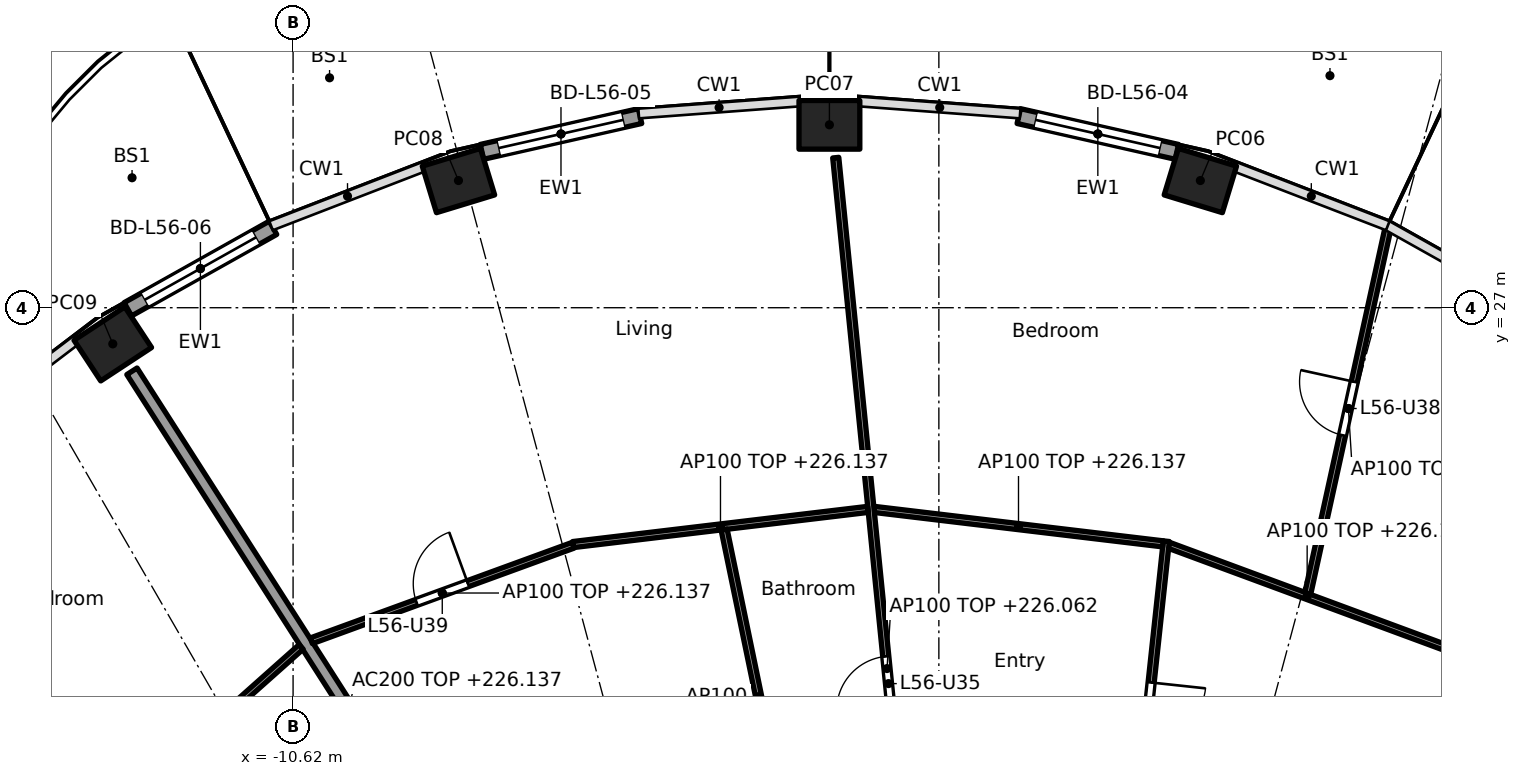
"""IFC4 building model, lengths in metres.
Left out: names, types, materials, properties, quantities, classifications, styles, units other than length and angle.
Written with IfcOpenShell. Run it as: python <this file> out.ifc"""

import sys

from ifc_helpers import new_model, si_unit, direction, frame, frame_2d, origin, origin_2d, place, context, subcontext, project, spatial, rectangle, hollow_rectangle, extrude, element, fill, save


model = new_model("IFC4")
c1 = context("Model", 3, precision=1e-05, world=origin(), true_north=direction((0.0, 1.0)))
c2 = subcontext(c1, "Body", "Model", "MODEL_VIEW")
j1 = project(units=[si_unit("LENGTHUNIT", "METRE"), si_unit("PLANEANGLEUNIT", "RADIAN")], contexts=[c1])
p1 = place(None, origin())
s1 = spatial("IfcSite", under=j1, at=p1, CompositionType="ELEMENT")
p2 = place(p1, origin())
s2 = spatial("IfcBuilding", under=s1, at=p2, CompositionType="ELEMENT")
p3 = place(p2, frame((0.0, 0.0, 223.3)))
s3 = spatial("IfcBuildingStorey", under=s2, at=p3, CompositionType="ELEMENT", Elevation=223.3)
for number, where, z_axis, x_axis in (
    (1, (4.3, 29.092, 0.0), (0.0, 0.0, 1.0), (-0.957, 0.292, 0.0)),
    (2, (-1.8, 30.008, 0.0), (0.0, 0.0, 1.0), (-1.0, 0.0, 0.0)),
    (3, (-7.9, 29.092, 0.0), (0.0, 0.0, 1.0), (-0.957, -0.292, 0.0)),
    (4, (-13.585, 26.405, 0.0), (0.0, 0.0, 1.0), (-0.836, -0.549, 0.0)),
):
    element("IfcColumn", number, at=place(p3, frame(where, z_axis=z_axis, x_axis=x_axis)), inside=s3, PredefinedType="COLUMN", context=c2, shape_type="SweptSolid", body=[
        extrude(hollow_rectangle(XDim=1.0, YDim=0.8, WallThickness=0.032, at=origin_2d()), origin(), (0.0, 0.0, 1.0), 3.7),
    ])
p4 = place(p3, frame((1.314, 30.151, 0.0), z_axis=(0.0, 0.0, 1.0), x_axis=(0.975324089124, -0.220777990694, 0.0)))
e5 = element("IfcWall", 5, at=p4, inside=s3, PredefinedType="SOLIDWALL", context=c2, shape_type="SweptSolid", body=[
    extrude(rectangle(XDim=2.666, YDim=0.25, at=frame_2d((1.333, 0.0))), origin(), (0.0, 0.0, 1.0), 3.44),
])
p5 = place(p4, frame((0.283, 0.0, 0.0)))
e6 = element("IfcOpeningElement", 6, at=p5, cuts=e5, PredefinedType="OPENING", context=c2, shape_type="SweptSolid", body=[
    extrude(rectangle(XDim=2.1, YDim=2.4, at=frame_2d((1.05, 1.2))), frame((0.0, 0.135, 0.0), z_axis=(0.0, -1.0, 0.0), x_axis=(1.0, 0.0, 0.0)), (0.0, 0.0, 1.0), 0.27),
])
p6 = place(p3, frame((-7.514, 29.563, 0.0), z_axis=(0.0, 0.0, 1.0), x_axis=(0.975324089124, 0.220777990694, 0.0)))
e7 = element("IfcWall", 7, at=p6, inside=s3, PredefinedType="SOLIDWALL", context=c2, shape_type="SweptSolid", body=[
    extrude(rectangle(XDim=2.666, YDim=0.25, at=frame_2d((1.333, 0.0))), origin(), (0.0, 0.0, 1.0), 3.44),
])
p7 = place(p6, frame((0.283, 0.0, 0.0)))
e8 = element("IfcOpeningElement", 8, at=p7, cuts=e7, PredefinedType="OPENING", context=c2, shape_type="SweptSolid", body=[
    extrude(rectangle(XDim=2.1, YDim=2.4, at=frame_2d((1.05, 1.2))), frame((0.0, 0.135, 0.0), z_axis=(0.0, -1.0, 0.0), x_axis=(1.0, 0.0, 0.0)), (0.0, 0.0, 1.0), 0.27),
])
p8 = place(p3, frame((-13.338, 26.974, 0.0), z_axis=(0.0, 0.0, 1.0), x_axis=(0.872101280701, 0.489325409313, 0.0)))
e9 = element("IfcWall", 9, at=p8, inside=s3, PredefinedType="SOLIDWALL", context=c2, shape_type="SweptSolid", body=[
    extrude(rectangle(XDim=2.738, YDim=0.25, at=frame_2d((1.369, 0.0))), origin(), (0.0, 0.0, 1.0), 3.44),
])
p9 = place(p8, frame((0.319, 0.0, 0.0)))
e10 = element("IfcOpeningElement", 10, at=p9, cuts=e9, PredefinedType="OPENING", context=c2, shape_type="SweptSolid", body=[
    extrude(rectangle(XDim=2.1, YDim=2.4, at=frame_2d((1.05, 1.2))), frame((0.0, 0.135, 0.0), z_axis=(0.0, -1.0, 0.0), x_axis=(1.0, 0.0, 0.0)), (0.0, 0.0, 1.0), 0.27),
])
p10 = place(p3, frame((-6.15, 14.824, 0.0), z_axis=(0.0, 0.0, 1.0), x_axis=(-0.538870687577, 0.842388498301, 0.0)))
e11 = element("IfcWall", 11, at=p10, inside=s3, PredefinedType="PARTITIONING", context=c2, shape_type="SweptSolid", body=[
    extrude(rectangle(XDim=13.213, YDim=0.2, at=frame_2d((6.606, 0.0))), origin(), (0.0, 0.0, 1.0), 2.837),
])
p11 = place(p3, frame((8.331, 21.411, 0.0), z_axis=(0.0, 0.0, 1.0), x_axis=(-0.937891982431, 0.346927412136, 0.0)))
e12 = element("IfcWall", 12, at=p11, inside=s3, PredefinedType="PARTITIONING", context=c2, shape_type="SweptSolid", body=[
    extrude(rectangle(XDim=4.85, YDim=0.1, at=frame_2d((2.425, 0.0))), origin(), (0.0, 0.0, 1.0), 2.837),
])
p12 = place(p3, frame((6.067, 22.301, 0.0), z_axis=(0.0, 0.0, 1.0), x_axis=(0.214401821533, 0.976745544614, 0.0)))
e13 = element("IfcWall", 13, at=p12, inside=s3, PredefinedType="PARTITIONING", context=c2, shape_type="SweptSolid", body=[
    extrude(rectangle(XDim=6.228, YDim=0.1, at=frame_2d((3.114, 0.0))), origin(), (0.0, 0.0, 1.0), 2.983),
])
p13 = place(p12, frame((2.664, 0.0, 0.0)))
e14 = element("IfcOpeningElement", 14, at=p13, cuts=e13, PredefinedType="OPENING", context=c2, shape_type="SweptSolid", body=[
    extrude(rectangle(XDim=0.9, YDim=2.1, at=frame_2d((0.45, 1.05))), frame((0.0, 0.06, 0.0), z_axis=(0.0, -1.0, 0.0), x_axis=(1.0, 0.0, 0.0)), (0.0, 0.0, 1.0), 0.12),
])
p14 = place(p3, frame((2.613, 12.664, 0.0), z_axis=(0.0, 0.0, 1.0), x_axis=(0.106823825758, 0.994277964279, 0.0)))
e15 = element("IfcWall", 15, at=p14, inside=s3, PredefinedType="PARTITIONING", context=c2, shape_type="SweptSolid", body=[
    extrude(rectangle(XDim=10.556, YDim=0.1, at=frame_2d((5.278, 0.0))), origin(), (0.0, 0.0, 1.0), 2.762),
])
p15 = place(p14, frame((2.066, 0.0, 0.0)))
e16 = element("IfcOpeningElement", 16, at=p15, cuts=e15, PredefinedType="OPENING", context=c2, shape_type="SweptSolid", body=[
    extrude(rectangle(XDim=0.9, YDim=2.1, at=frame_2d((0.45, 1.05))), frame((0.0, 0.06, 0.0), z_axis=(0.0, -1.0, 0.0), x_axis=(1.0, 0.0, 0.0)), (0.0, 0.0, 1.0), 0.12),
])
p16 = place(p14, frame((7.32, 0.0, 0.0)))
e17 = element("IfcOpeningElement", 17, at=p16, cuts=e15, PredefinedType="OPENING", context=c2, shape_type="SweptSolid", body=[
    extrude(rectangle(XDim=0.9, YDim=2.1, at=frame_2d((0.45, 1.05))), frame((0.0, 0.06, 0.0), z_axis=(0.0, -1.0, 0.0), x_axis=(1.0, 0.0, 0.0)), (0.0, 0.0, 1.0), 0.12),
])
p17 = place(p3, frame((3.686, 23.117, 0.0), z_axis=(0.0, 0.0, 1.0), x_axis=(-0.992965872314, 0.11840091393, 0.0)))
e18 = element("IfcWall", 18, at=p17, inside=s3, PredefinedType="PARTITIONING", context=c2, shape_type="SweptSolid", body=[
    extrude(rectangle(XDim=4.786, YDim=0.1, at=frame_2d((2.393, 0.0))), origin(), (0.0, 0.0, 1.0), 2.837),
])
p18 = place(p3, frame((-0.01, 12.664, 0.0), z_axis=(0.0, 0.0, 1.0), x_axis=(-0.099808591851, 0.995006655753, 0.0)))
e19 = element("IfcWall", 19, at=p18, inside=s3, PredefinedType="PARTITIONING", context=c2, shape_type="SweptSolid", body=[
    extrude(rectangle(XDim=16.888, YDim=0.1, at=frame_2d((8.444, 0.0))), origin(), (0.0, 0.0, 1.0), 2.762),
])
p19 = place(p18, frame((2.205, 0.0, 0.0)))
e20 = element("IfcOpeningElement", 20, at=p19, cuts=e19, PredefinedType="OPENING", context=c2, shape_type="SweptSolid", body=[
    extrude(rectangle(XDim=0.9, YDim=2.1, at=frame_2d((0.45, 1.05))), frame((0.0, 0.06, 0.0), z_axis=(0.0, -1.0, 0.0), x_axis=(1.0, 0.0, 0.0)), (0.0, 0.0, 1.0), 0.12),
])
p20 = place(p18, frame((7.745, 0.0, 0.0)))
e21 = element("IfcOpeningElement", 21, at=p20, cuts=e19, PredefinedType="OPENING", context=c2, shape_type="SweptSolid", body=[
    extrude(rectangle(XDim=0.9, YDim=2.1, at=frame_2d((0.45, 1.05))), frame((0.0, 0.06, 0.0), z_axis=(0.0, -1.0, 0.0), x_axis=(1.0, 0.0, 0.0)), (0.0, 0.0, 1.0), 0.12),
])
p21 = place(p3, frame((-1.166, 23.683, 0.0), z_axis=(0.0, 0.0, 1.0), x_axis=(-0.992961712415, -0.118435795593, 0.0)))
e22 = element("IfcWall", 22, at=p21, inside=s3, PredefinedType="PARTITIONING", context=c2, shape_type="SweptSolid", body=[
    extrude(rectangle(XDim=4.885, YDim=0.1, at=frame_2d((2.443, 0.0))), origin(), (0.0, 0.0, 1.0), 2.837),
])
p22 = place(p3, frame((-2.395, 17.857, 0.0), z_axis=(0.0, 0.0, 1.0), x_axis=(-0.20251351451, 0.979279467997, 0.0)))
e23 = element("IfcWall", 23, at=p22, inside=s3, PredefinedType="PARTITIONING", context=c2, shape_type="SweptSolid", body=[
    extrude(rectangle(XDim=5.611, YDim=0.1, at=frame_2d((2.805, 0.0))), origin(), (0.0, 0.0, 1.0), 3.44),
])
p23 = place(p3, frame((-6.014, 23.094, 0.0), z_axis=(0.0, 0.0, 1.0), x_axis=(-0.939433575811, -0.342731026665, 0.0)))
e24 = element("IfcWall", 24, at=p23, inside=s3, PredefinedType="PARTITIONING", context=c2, shape_type="SweptSolid", body=[
    extrude(rectangle(XDim=4.583, YDim=0.1, at=frame_2d((2.291, 0.0))), origin(), (0.0, 0.0, 1.0), 2.837),
])
p24 = place(p23, frame((1.841, 0.0, 0.0)))
e25 = element("IfcOpeningElement", 25, at=p24, cuts=e24, PredefinedType="OPENING", context=c2, shape_type="SweptSolid", body=[
    extrude(rectangle(XDim=0.9, YDim=2.1, at=frame_2d((0.45, 1.05))), frame((0.0, 0.06, 0.0), z_axis=(0.0, -1.0, 0.0), x_axis=(1.0, 0.0, 0.0)), (0.0, 0.0, 1.0), 0.12),
])
p25 = place(p3, frame((-10.488, 21.422, 0.0), z_axis=(0.0, 0.0, 1.0), x_axis=(-0.747148551049, -0.664657086523, 0.0)))
e26 = element("IfcWall", 26, at=p25, inside=s3, PredefinedType="PARTITIONING", context=c2, shape_type="SweptSolid", body=[
    extrude(rectangle(XDim=5.425, YDim=0.1, at=frame_2d((2.712, 0.0))), origin(), (0.0, 0.0, 1.0), 2.837),
])
p26 = place(p25, frame((2.262, 0.0, 0.0)))
e27 = element("IfcOpeningElement", 27, at=p26, cuts=e26, PredefinedType="OPENING", context=c2, shape_type="SweptSolid", body=[
    extrude(rectangle(XDim=0.9, YDim=2.1, at=frame_2d((0.45, 1.05))), frame((0.0, 0.06, 0.0), z_axis=(0.0, -1.0, 0.0), x_axis=(1.0, 0.0, 0.0)), (0.0, 0.0, 1.0), 0.12),
])
p27 = place(p3, frame((-14.545, 17.746, 0.0), z_axis=(0.0, 0.0, 1.0), x_axis=(-0.669829144173, 0.742515264232, 0.0)))
e28 = element("IfcWall", 28, at=p27, inside=s3, PredefinedType="PARTITIONING", context=c2, shape_type="SweptSolid", body=[
    extrude(rectangle(XDim=5.334, YDim=0.1, at=frame_2d((2.667, 0.0))), origin(), (0.0, 0.0, 1.0), 2.837),
])
p28 = place(p5, origin())
e29 = element("IfcDoor", 29, at=p28, inside=s3, OperationType="SLIDING_TO_LEFT", PredefinedType="DOOR", context=c2, shape_type="SweptSolid", body=[
    extrude(rectangle(XDim=2.1, YDim=2.4, at=frame_2d((1.05, 1.2))), frame((0.0, 0.025, 0.0), z_axis=(0.0, -1.0, 0.0), x_axis=(1.0, 0.0, 0.0)), (0.0, 0.0, 1.0), 0.05),
])
fill(e6, e29)
p29 = place(p7, origin())
e30 = element("IfcDoor", 30, at=p29, inside=s3, OperationType="SLIDING_TO_LEFT", PredefinedType="DOOR", context=c2, shape_type="SweptSolid", body=[
    extrude(rectangle(XDim=2.1, YDim=2.4, at=frame_2d((1.05, 1.2))), frame((0.0, 0.025, 0.0), z_axis=(0.0, -1.0, 0.0), x_axis=(1.0, 0.0, 0.0)), (0.0, 0.0, 1.0), 0.05),
])
fill(e8, e30)
p30 = place(p9, origin())
e31 = element("IfcDoor", 31, at=p30, inside=s3, OperationType="SLIDING_TO_LEFT", PredefinedType="DOOR", context=c2, shape_type="SweptSolid", body=[
    extrude(rectangle(XDim=2.1, YDim=2.4, at=frame_2d((1.05, 1.2))), frame((0.0, 0.025, 0.0), z_axis=(0.0, -1.0, 0.0), x_axis=(1.0, 0.0, 0.0)), (0.0, 0.0, 1.0), 0.05),
])
fill(e10, e31)
p31 = place(p16, frame((0.9, 0.0, 0.0), x_axis=(-1.0, 0.0, 0.0)))
e32 = element("IfcDoor", 32, at=p31, inside=s3, OperationType="SINGLE_SWING_LEFT", PredefinedType="DOOR", context=c2, shape_type="SweptSolid", body=[
    extrude(rectangle(XDim=0.9, YDim=2.1, at=frame_2d((0.45, 1.05))), frame((0.0, 0.025, 0.0), z_axis=(0.0, -1.0, 0.0), x_axis=(1.0, 0.0, 0.0)), (0.0, 0.0, 1.0), 0.05),
])
fill(e17, e32)
p32 = place(p20, origin())
e33 = element("IfcDoor", 33, at=p32, inside=s3, OperationType="SINGLE_SWING_LEFT", PredefinedType="DOOR", context=c2, shape_type="SweptSolid", body=[
    extrude(rectangle(XDim=0.9, YDim=2.1, at=frame_2d((0.45, 1.05))), frame((0.0, 0.025, 0.0), z_axis=(0.0, -1.0, 0.0), x_axis=(1.0, 0.0, 0.0)), (0.0, 0.0, 1.0), 0.05),
])
fill(e21, e33)
p33 = place(p13, origin())
e34 = element("IfcDoor", 34, at=p33, inside=s3, OperationType="SINGLE_SWING_RIGHT", PredefinedType="DOOR", context=c2, shape_type="SweptSolid", body=[
    extrude(rectangle(XDim=0.9, YDim=2.1, at=frame_2d((0.45, 1.05))), frame((0.0, 0.025, 0.0), z_axis=(0.0, -1.0, 0.0), x_axis=(1.0, 0.0, 0.0)), (0.0, 0.0, 1.0), 0.05),
])
fill(e14, e34)
p34 = place(p24, frame((0.9, 0.0, 0.0), x_axis=(-1.0, 0.0, 0.0)))
e35 = element("IfcDoor", 35, at=p34, inside=s3, OperationType="SINGLE_SWING_RIGHT", PredefinedType="DOOR", context=c2, shape_type="SweptSolid", body=[
    extrude(rectangle(XDim=0.9, YDim=2.1, at=frame_2d((0.45, 1.05))), frame((0.0, 0.025, 0.0), z_axis=(0.0, -1.0, 0.0), x_axis=(1.0, 0.0, 0.0)), (0.0, 0.0, 1.0), 0.05),
])
fill(e25, e35)
save(model, sys.argv[1])
